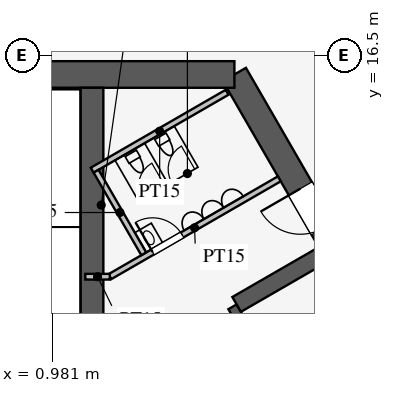
"""IFC4 building model, lengths in metres.
Left out: names, types, materials, properties, quantities, classifications, styles, units other than length and angle.
Written with IfcOpenShell. Run it as: python <this file> out.ifc"""

import sys

from ifc_helpers import new_model, si_unit, direction, frame, frame_2d, origin, place, context, subcontext, project, spatial, rectangle, extrude, element, fill, save


model = new_model("IFC4")
c1 = context("Model", 3, precision=1e-05, world=origin(), true_north=direction((0.0, 1.0)))
c2 = subcontext(c1, "Body", "Model", "MODEL_VIEW")
j1 = project(units=[si_unit("LENGTHUNIT", "METRE"), si_unit("PLANEANGLEUNIT", "RADIAN")], contexts=[c1])
p1 = place(None, origin())
s1 = spatial("IfcSite", under=j1, at=p1, CompositionType="ELEMENT")
p2 = place(p1, origin())
s2 = spatial("IfcBuilding", under=s1, at=p2, CompositionType="ELEMENT")
p3 = place(p2, frame((0.0, 0.0, 248.5)))
s3 = spatial("IfcBuildingStorey", under=s2, at=p3, CompositionType="ELEMENT", Elevation=248.5)
p4 = place(p3, frame((16.743, -3.0, 0.0), z_axis=(0.0, 0.0, 1.0), x_axis=(-0.500002442456, 0.866023993627, 0.0)))
e1 = element("IfcWall", 1, at=p4, inside=s3, PredefinedType="SHEAR", context=c2, shape_type="SweptSolid", body=[
    extrude(rectangle(XDim=21.939, YDim=0.7, at=frame_2d((10.97, 0.0))), origin(), (0.0, 0.0, 1.0), 4.2),
])
p5 = place(p4, frame((17.27, 0.0, 0.0)))
e2 = element("IfcOpeningElement", 2, at=p5, cuts=e1, PredefinedType="OPENING", context=c2, shape_type="SweptSolid", body=[
    extrude(rectangle(XDim=1.2, YDim=2.1, at=frame_2d((0.6, 1.05))), frame((0.0, 0.36, 0.0), z_axis=(0.0, -1.0, 0.0), x_axis=(1.0, 0.0, 0.0)), (0.0, 0.0, 1.0), 0.72),
])
p6 = place(p4, frame((3.47, 0.0, 0.0)))
e3 = element("IfcOpeningElement", 3, at=p6, cuts=e1, PredefinedType="OPENING", context=c2, shape_type="SweptSolid", body=[
    extrude(rectangle(XDim=1.2, YDim=2.1, at=frame_2d((0.6, 1.05))), frame((0.0, 0.36, 0.0), z_axis=(0.0, -1.0, 0.0), x_axis=(1.0, 0.0, 0.0)), (0.0, 0.0, 1.0), 0.72),
])
p7 = place(p3, frame((5.773, 16.0, 0.0), z_axis=(0.0, 0.0, 1.0), x_axis=(-1.0, 0.0, 0.0)))
e4 = element("IfcWall", 4, at=p7, inside=s3, PredefinedType="SHEAR", context=c2, shape_type="SweptSolid", body=[
    extrude(rectangle(XDim=11.547, YDim=0.7, at=frame_2d((5.773, 0.0))), origin(), (0.0, 0.0, 1.0), 4.2),
])
p8 = place(p3, frame((11.424, 0.014, 0.0), z_axis=(0.0, 0.0, 1.0), x_axis=(-0.500001763848, 0.866024385424, 0.0)))
e5 = element("IfcWall", 5, at=p8, inside=s3, PredefinedType="SHEAR", context=c2, shape_type="SweptSolid", body=[
    extrude(rectangle(XDim=11.4, YDim=0.25, at=frame_2d((5.7, 0.0))), origin(), (0.0, 0.0, 1.0), 4.2),
])
p9 = place(p8, frame((0.975, 0.0, 0.0)))
e6 = element("IfcOpeningElement", 6, at=p9, cuts=e5, PredefinedType="OPENING", context=c2, shape_type="SweptSolid", body=[
    extrude(rectangle(XDim=0.9, YDim=2.1, at=frame_2d((0.45, 1.05))), frame((0.0, 0.135, 0.0), z_axis=(0.0, -1.0, 0.0), x_axis=(1.0, 0.0, 0.0)), (0.0, 0.0, 1.0), 0.27),
])
p10 = place(p8, frame((3.825, 0.0, 0.0)))
e7 = element("IfcOpeningElement", 7, at=p10, cuts=e5, PredefinedType="OPENING", context=c2, shape_type="SweptSolid", body=[
    extrude(rectangle(XDim=0.9, YDim=2.1, at=frame_2d((0.45, 1.05))), frame((0.0, 0.135, 0.0), z_axis=(0.0, -1.0, 0.0), x_axis=(1.0, 0.0, 0.0)), (0.0, 0.0, 1.0), 0.27),
])
p11 = place(p8, frame((6.675, 0.0, 0.0)))
e8 = element("IfcOpeningElement", 8, at=p11, cuts=e5, PredefinedType="OPENING", context=c2, shape_type="SweptSolid", body=[
    extrude(rectangle(XDim=0.9, YDim=2.1, at=frame_2d((0.45, 1.05))), frame((0.0, 0.135, 0.0), z_axis=(0.0, -1.0, 0.0), x_axis=(1.0, 0.0, 0.0)), (0.0, 0.0, 1.0), 0.27),
])
p12 = place(p8, frame((9.525, 0.0, 0.0)))
e9 = element("IfcOpeningElement", 9, at=p12, cuts=e5, PredefinedType="OPENING", context=c2, shape_type="SweptSolid", body=[
    extrude(rectangle(XDim=0.9, YDim=2.1, at=frame_2d((0.45, 1.05))), frame((0.0, 0.135, 0.0), z_axis=(0.0, -1.0, 0.0), x_axis=(1.0, 0.0, 0.0)), (0.0, 0.0, 1.0), 0.27),
])
p13 = place(p3, frame((5.832, 9.949, 0.0), z_axis=(0.0, 0.0, 1.0), x_axis=(0.866036909293, 0.499980071345, 0.0)))
e10 = element("IfcWall", 10, at=p13, inside=s3, PredefinedType="SHEAR", context=c2, shape_type="SweptSolid", body=[
    extrude(rectangle(XDim=2.625, YDim=0.45, at=frame_2d((1.312, 0.0))), origin(), (0.0, 0.0, 1.0), 4.2),
])
p14 = place(p3, frame((2.025, 6.525, 0.0), z_axis=(0.0, 0.0, 1.0), x_axis=(0.0, 1.0, 0.0)))
e11 = element("IfcWall", 11, at=p14, inside=s3, PredefinedType="SHEAR", context=c2, shape_type="SweptSolid", body=[
    extrude(rectangle(XDim=9.125, YDim=0.6, at=frame_2d((4.562, 0.0))), origin(), (0.0, 0.0, 1.0), 4.2),
])
p15 = place(p3, frame((2.495, 10.678, 0.0), z_axis=(0.0, 0.0, 1.0), x_axis=(0.866037967349, 0.499978238636, 0.0)))
e12 = element("IfcWall", 12, at=p15, inside=s3, PredefinedType="PARTITIONING", context=c2, shape_type="SweptSolid", body=[
    extrude(rectangle(XDim=5.15, YDim=0.15, at=frame_2d((2.575, 0.0))), origin(), (0.0, 0.0, 1.0), 4.0),
])
p16 = place(p15, frame((1.3, 0.0, 0.0)))
e13 = element("IfcOpeningElement", 13, at=p16, cuts=e12, PredefinedType="OPENING", context=c2, shape_type="SweptSolid", body=[
    extrude(rectangle(XDim=0.9, YDim=2.1, at=frame_2d((0.45, 1.05))), frame((0.0, 0.085, 0.0), z_axis=(0.0, -1.0, 0.0), x_axis=(1.0, 0.0, 0.0)), (0.0, 0.0, 1.0), 0.17),
])
p17 = place(p3, frame((2.495, 10.678, 0.0), z_axis=(0.0, 0.0, 1.0), x_axis=(-1.0, 0.0, 0.0)))
e14 = element("IfcWall", 14, at=p17, inside=s3, PredefinedType="PARTITIONING", context=c2, shape_type="SweptSolid", body=[
    extrude(rectangle(XDim=0.645, YDim=0.15, at=frame_2d((0.323, 0.0))), origin(), (0.0, 0.0, 1.0), 4.0),
])
p18 = place(p3, frame((2.031, 13.482, 0.0), z_axis=(0.0, 0.0, 1.0), x_axis=(0.866050731258, 0.499956128963, 0.0)))
e15 = element("IfcWall", 15, at=p18, inside=s3, PredefinedType="PARTITIONING", context=c2, shape_type="SweptSolid", body=[
    extrude(rectangle(XDim=4.1, YDim=0.15, at=frame_2d((2.05, 0.0))), origin(), (0.0, 0.0, 1.0), 4.0),
])
p19 = place(p3, frame((3.389, 11.281, 0.0), z_axis=(0.0, 0.0, 1.0), x_axis=(-0.499989096993, 0.866031698547, 0.0)))
e16 = element("IfcWall", 16, at=p19, inside=s3, PredefinedType="PARTITIONING", context=c2, shape_type="SweptSolid", body=[
    extrude(rectangle(XDim=2.51, YDim=0.15, at=frame_2d((1.255, 0.0))), origin(), (0.0, 0.0, 1.0), 4.0),
])
p20 = place(p16, origin())
e17 = element("IfcDoor", 17, at=p20, inside=s3, OperationType="SINGLE_SWING_LEFT", PredefinedType="DOOR", context=c2, shape_type="SweptSolid", body=[
    extrude(rectangle(XDim=0.9, YDim=2.1, at=frame_2d((0.45, 1.05))), frame((0.0, 0.025, 0.0), z_axis=(0.0, -1.0, 0.0), x_axis=(1.0, 0.0, 0.0)), (0.0, 0.0, 1.0), 0.05),
])
fill(e13, e17)
p21 = place(p5, origin())
e18 = element("IfcDoor", 18, at=p21, inside=s3, OperationType="SINGLE_SWING_RIGHT", PredefinedType="DOOR", context=c2, shape_type="SweptSolid", body=[
    extrude(rectangle(XDim=1.2, YDim=2.1, at=frame_2d((0.6, 1.05))), frame((0.0, 0.025, 0.0), z_axis=(0.0, -1.0, 0.0), x_axis=(1.0, 0.0, 0.0)), (0.0, 0.0, 1.0), 0.05),
])
fill(e2, e18)
save(model, sys.argv[1])
